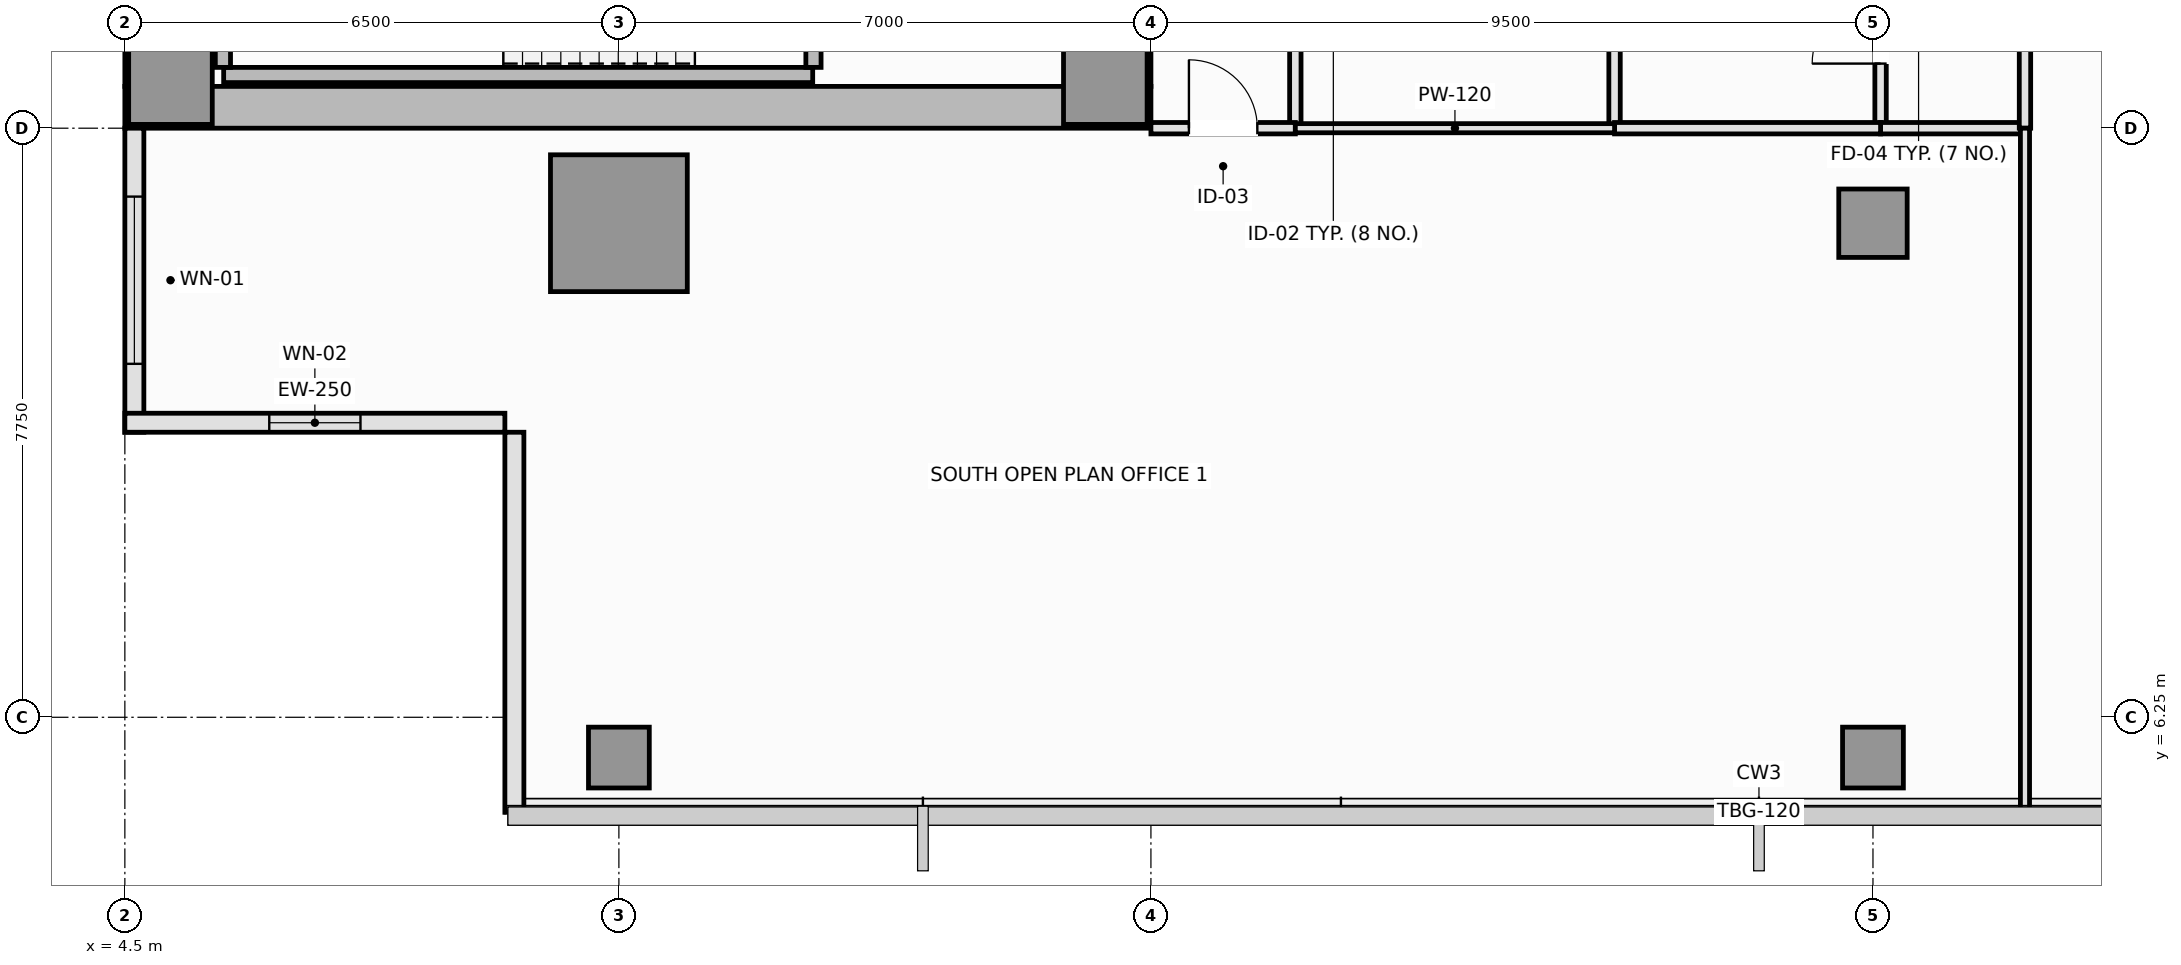
"""IFC4 building model, lengths in metres.
Left out: names, types, materials, properties, quantities, classifications, styles, units other than length and angle.
Written with IfcOpenShell. Run it as: python <this file> out.ifc"""

import sys

from ifc_helpers import new_model, si_unit, direction, frame, frame_2d, origin, origin_2d, place, context, subcontext, project, spatial, rectangle, extrude, element, fill, save


model = new_model("IFC4")
c1 = context("Model", 3, precision=1e-05, world=origin(), true_north=direction((0.0, 1.0)))
c2 = subcontext(c1, "Body", "Model", "MODEL_VIEW")
j1 = project(units=[si_unit("LENGTHUNIT", "METRE"), si_unit("PLANEANGLEUNIT", "RADIAN")], contexts=[c1])
p1 = place(None, origin())
s1 = spatial("IfcSite", under=j1, at=p1, CompositionType="ELEMENT")
p2 = place(p1, origin())
s2 = spatial("IfcBuilding", under=s1, at=p2, CompositionType="ELEMENT")
p3 = place(p2, frame((0.0, 0.0, 191.6)))
s3 = spatial("IfcBuildingStorey", under=s2, at=p3, CompositionType="ELEMENT", Elevation=191.6)
p4 = place(p3, frame((4.5, 14.275, 0.0), z_axis=(0.0, 0.0, 1.0), x_axis=(1.0, 0.0, 0.0)))
e1 = element("IfcWall", 1, at=p4, inside=s3, PredefinedType="SHEAR", context=c2, shape_type="SweptSolid", body=[
    extrude(rectangle(XDim=13.5, YDim=0.55, at=frame_2d((6.75, 0.0))), origin(), (0.0, 0.0, 1.0), 3.55),
])
p5 = place(p3, frame((4.775, 14.55, 0.0), z_axis=(0.0, 0.0, 1.0), x_axis=(0.0, 1.0, 0.0)))
e2 = element("IfcWall", 2, at=p5, inside=s3, PredefinedType="SHEAR", context=c2, shape_type="SweptSolid", body=[
    extrude(rectangle(XDim=21.4, YDim=0.55, at=frame_2d((10.7, 0.0))), origin(), (0.0, 0.0, 1.0), 3.55),
])
p6 = place(p3, frame((17.725, 14.55, 0.0), z_axis=(0.0, 0.0, 1.0), x_axis=(0.0, 1.0, 0.0)))
e3 = element("IfcWall", 3, at=p6, inside=s3, PredefinedType="SHEAR", context=c2, shape_type="SweptSolid", body=[
    extrude(rectangle(XDim=8.9, YDim=0.55, at=frame_2d((4.45, 0.0))), origin(), (0.0, 0.0, 1.0), 3.55),
])
p7 = place(p6, frame((4.35, 0.0, 0.0)))
e4 = element("IfcOpeningElement", 4, at=p7, cuts=e3, PredefinedType="OPENING", context=c2, shape_type="SweptSolid", body=[
    extrude(rectangle(XDim=1.1, YDim=2.15, at=frame_2d((0.55, 1.075))), frame((0.0, 0.285, 0.0), z_axis=(0.0, -1.0, 0.0), x_axis=(1.0, 0.0, 0.0)), (0.0, 0.0, 1.0), 0.57),
])
for number, where, z_axis, x_axis in (
    (5, (5.1, 14.6, 0.0), (0.0, 0.0, 1.0), (1.0, 0.0, 0.0)),
    (6, (17.4, 14.6, 0.0), (0.0, 0.0, 1.0), (1.0, 0.0, 0.0)),
):
    element("IfcColumn", number, at=place(p3, frame(where, z_axis=z_axis, x_axis=x_axis)), inside=s3, PredefinedType="PILASTER", context=c2, shape_type="SweptSolid", body=[
        extrude(rectangle(XDim=1.1, YDim=1.1, at=origin_2d()), origin(), (0.0, 0.0, 1.0), 3.55),
    ])
p8 = place(p3, frame((11.0, 12.75, 0.0), z_axis=(0.0, 0.0, 1.0), x_axis=(1.0, 0.0, 0.0)))
e7 = element("IfcColumn", 7, at=p8, inside=s3, PredefinedType="COLUMN", context=c2, shape_type="SweptSolid", body=[
    extrude(rectangle(XDim=1.8, YDim=1.8, at=origin_2d()), origin(), (0.0, 0.0, 1.0), 3.55),
])
p9 = place(p3, frame((27.5, 12.75, 0.0), z_axis=(0.0, 0.0, 1.0), x_axis=(1.0, 0.0, 0.0)))
e8 = element("IfcColumn", 8, at=p9, inside=s3, PredefinedType="COLUMN", context=c2, shape_type="SweptSolid", body=[
    extrude(rectangle(XDim=0.9, YDim=0.9, at=origin_2d()), origin(), (0.0, 0.0, 1.0), 3.55),
])
for number, where, z_axis, x_axis in (
    (9, (11.0, 5.72, 0.0), (0.0, 0.0, 1.0), (1.0, 0.0, 0.0)),
    (10, (27.5, 5.72, 0.0), (0.0, 0.0, 1.0), (1.0, 0.0, 0.0)),
):
    element("IfcColumn", number, at=place(p3, frame(where, z_axis=z_axis, x_axis=x_axis)), inside=s3, PredefinedType="COLUMN", context=c2, shape_type="SweptSolid", body=[
        extrude(rectangle(XDim=0.8, YDim=0.8, at=origin_2d()), origin(), (0.0, 0.0, 1.0), 3.55),
    ])
p10 = place(p3, frame((4.625, 14.0, 0.0), z_axis=(0.0, 0.0, 1.0), x_axis=(0.0, -1.0, 0.0)))
e11 = element("IfcWall", 11, at=p10, inside=s3, PredefinedType="SOLIDWALL", context=c2, shape_type="SweptSolid", body=[
    extrude(rectangle(XDim=4.0, YDim=0.25, at=frame_2d((2.0, 0.0))), origin(), (0.0, 0.0, 1.0), 3.37),
])
p11 = place(p10, frame((0.9, 0.0, 0.9)))
e12 = element("IfcOpeningElement", 12, at=p11, cuts=e11, PredefinedType="OPENING", context=c2, shape_type="SweptSolid", body=[
    extrude(rectangle(XDim=2.2, YDim=1.8, at=frame_2d((1.1, 0.9))), frame((0.0, 0.135, 0.0), z_axis=(0.0, -1.0, 0.0), x_axis=(1.0, 0.0, 0.0)), (0.0, 0.0, 1.0), 0.27),
])
p12 = place(p3, frame((4.5, 10.125, 0.0), z_axis=(0.0, 0.0, 1.0), x_axis=(1.0, 0.0, 0.0)))
e13 = element("IfcWall", 13, at=p12, inside=s3, PredefinedType="SOLIDWALL", context=c2, shape_type="SweptSolid", body=[
    extrude(rectangle(XDim=5.0, YDim=0.25, at=frame_2d((2.5, 0.0))), origin(), (0.0, 0.0, 1.0), 3.37),
])
p13 = place(p12, frame((1.9, 0.0, 0.9)))
e14 = element("IfcOpeningElement", 14, at=p13, cuts=e13, PredefinedType="OPENING", context=c2, shape_type="SweptSolid", body=[
    extrude(rectangle(XDim=1.2, YDim=1.8, at=frame_2d((0.6, 0.9))), frame((0.0, 0.135, 0.0), z_axis=(0.0, -1.0, 0.0), x_axis=(1.0, 0.0, 0.0)), (0.0, 0.0, 1.0), 0.27),
])
p14 = place(p3, frame((9.625, 10.0, 0.0), z_axis=(0.0, 0.0, 1.0), x_axis=(0.0, -1.0, 0.0)))
e15 = element("IfcWall", 15, at=p14, inside=s3, PredefinedType="SOLIDWALL", context=c2, shape_type="SweptSolid", body=[
    extrude(rectangle(XDim=5.0, YDim=0.25, at=frame_2d((2.5, 0.0))), origin(), (0.0, 0.0, 1.0), 3.37),
])
p15 = place(p3, frame((5.8, 14.7, 0.0), z_axis=(0.0, 0.0, 1.0), x_axis=(1.0, 0.0, 0.0)))
e16 = element("IfcWall", 16, at=p15, inside=s3, PredefinedType="SOLIDWALL", context=c2, shape_type="SweptSolid", body=[
    extrude(rectangle(XDim=7.75, YDim=0.2, at=frame_2d((3.875, 0.0))), origin(), (0.0, 0.0, 1.0), 3.55),
])
p16 = place(p3, frame((5.79, 14.8, 0.0), z_axis=(0.0, 0.0, 1.0), x_axis=(0.0, 1.0, 0.0)))
e17 = element("IfcWall", 17, at=p16, inside=s3, PredefinedType="SOLIDWALL", context=c2, shape_type="SweptSolid", body=[
    extrude(rectangle(XDim=3.05, YDim=0.2, at=frame_2d((1.525, 0.0))), origin(), (0.0, 0.0, 1.0), 3.55),
])
p17 = place(p3, frame((13.56, 14.8, 0.0), z_axis=(0.0, 0.0, 1.0), x_axis=(0.0, 1.0, 0.0)))
e18 = element("IfcWall", 18, at=p17, inside=s3, PredefinedType="SOLIDWALL", context=c2, shape_type="SweptSolid", body=[
    extrude(rectangle(XDim=3.05, YDim=0.2, at=frame_2d((1.525, 0.0))), origin(), (0.0, 0.0, 1.0), 3.55),
])
p18 = place(p17, frame((0.95, 0.0, 0.0)))
e19 = element("IfcOpeningElement", 19, at=p18, cuts=e18, PredefinedType="OPENING", context=c2, shape_type="SweptSolid", body=[
    extrude(rectangle(XDim=1.15, YDim=2.15, at=frame_2d((0.575, 1.075))), frame((0.0, 0.11, 0.0), z_axis=(0.0, -1.0, 0.0), x_axis=(1.0, 0.0, 0.0)), (0.0, 0.0, 1.0), 0.22),
])
p19 = place(p3, frame((19.9, 14.0, 0.0), z_axis=(0.0, 0.0, 1.0), x_axis=(0.0, 1.0, 0.0)))
e20 = element("IfcWall", 20, at=p19, inside=s3, PredefinedType="PARTITIONING", context=c2, shape_type="SweptSolid", body=[
    extrude(rectangle(XDim=3.2, YDim=0.15, at=frame_2d((1.6, 0.0))), origin(), (0.0, 0.0, 1.0), 3.37),
])
p20 = place(p19, frame((1.1, 0.0, 0.0)))
e21 = element("IfcOpeningElement", 21, at=p20, cuts=e20, PredefinedType="OPENING", context=c2, shape_type="SweptSolid", body=[
    extrude(rectangle(XDim=1.0, YDim=2.15, at=frame_2d((0.5, 1.075))), frame((0.0, 0.085, 0.0), z_axis=(0.0, -1.0, 0.0), x_axis=(1.0, 0.0, 0.0)), (0.0, 0.0, 1.0), 0.17),
])
p21 = place(p3, frame((18.0, 14.0, 0.0), z_axis=(0.0, 0.0, 1.0), x_axis=(1.0, 0.0, 0.0)))
e22 = element("IfcWall", 22, at=p21, inside=s3, PredefinedType="PARTITIONING", context=c2, shape_type="SweptSolid", body=[
    extrude(rectangle(XDim=1.9, YDim=0.15, at=frame_2d((0.95, 0.0))), origin(), (0.0, 0.0, 1.0), 3.37),
])
p22 = place(p21, frame((0.5, 0.0, 0.0)))
e23 = element("IfcOpeningElement", 23, at=p22, cuts=e22, PredefinedType="OPENING", context=c2, shape_type="SweptSolid", body=[
    extrude(rectangle(XDim=0.9, YDim=2.1, at=frame_2d((0.45, 1.05))), frame((0.0, 0.085, 0.0), z_axis=(0.0, -1.0, 0.0), x_axis=(1.0, 0.0, 0.0)), (0.0, 0.0, 1.0), 0.17),
])
p23 = place(p3, frame((27.6, 14.0, 0.0), z_axis=(0.0, 0.0, 1.0), x_axis=(0.0, 1.0, 0.0)))
e24 = element("IfcWall", 24, at=p23, inside=s3, PredefinedType="PLUMBINGWALL", context=c2, shape_type="SweptSolid", body=[
    extrude(rectangle(XDim=2.6, YDim=0.15, at=frame_2d((1.3, 0.0))), origin(), (0.0, 0.0, 1.0), 3.37),
])
p24 = place(p23, frame((0.85, 0.0, 0.0)))
e25 = element("IfcOpeningElement", 25, at=p24, cuts=e24, PredefinedType="OPENING", context=c2, shape_type="SweptSolid", body=[
    extrude(rectangle(XDim=0.9, YDim=2.1, at=frame_2d((0.45, 1.05))), frame((0.0, 0.085, 0.0), z_axis=(0.0, -1.0, 0.0), x_axis=(1.0, 0.0, 0.0)), (0.0, 0.0, 1.0), 0.17),
])
p25 = place(p3, frame((27.6, 14.0, 0.0), z_axis=(0.0, 0.0, 1.0), x_axis=(1.0, 0.0, 0.0)))
e26 = element("IfcWall", 26, at=p25, inside=s3, PredefinedType="PARTITIONING", context=c2, shape_type="SweptSolid", body=[
    extrude(rectangle(XDim=1.9, YDim=0.15, at=frame_2d((0.95, 0.0))), origin(), (0.0, 0.0, 1.0), 3.37),
])
p26 = place(p3, frame((29.5, 14.0, 0.0), z_axis=(0.0, 0.0, 1.0), x_axis=(0.0, 1.0, 0.0)))
e27 = element("IfcWall", 27, at=p26, inside=s3, PredefinedType="PARTITIONING", context=c2, shape_type="SweptSolid", body=[
    extrude(rectangle(XDim=22.5, YDim=0.15, at=frame_2d((11.25, 0.0))), origin(), (0.0, 0.0, 1.0), 3.37),
])
p27 = place(p26, frame((10.75, 0.0, 0.0)))
e28 = element("IfcOpeningElement", 28, at=p27, cuts=e27, PredefinedType="OPENING", context=c2, shape_type="SweptSolid", body=[
    extrude(rectangle(XDim=1.0, YDim=2.15, at=frame_2d((0.5, 1.075))), frame((0.0, 0.085, 0.0), z_axis=(0.0, -1.0, 0.0), x_axis=(1.0, 0.0, 0.0)), (0.0, 0.0, 1.0), 0.17),
])
p28 = place(p3, frame((24.1, 14.0, 0.0), z_axis=(0.0, 0.0, 1.0), x_axis=(0.0, 1.0, 0.0)))
e29 = element("IfcWall", 29, at=p28, inside=s3, PredefinedType="PLUMBINGWALL", context=c2, shape_type="SweptSolid", body=[
    extrude(rectangle(XDim=2.6, YDim=0.15, at=frame_2d((1.3, 0.0))), origin(), (0.0, 0.0, 1.0), 3.07),
])
p29 = place(p3, frame((24.1, 14.0, 0.0), z_axis=(0.0, 0.0, 1.0), x_axis=(1.0, 0.0, 0.0)))
e30 = element("IfcWall", 30, at=p29, inside=s3, PredefinedType="PLUMBINGWALL", context=c2, shape_type="SweptSolid", body=[
    extrude(rectangle(XDim=3.5, YDim=0.15, at=frame_2d((1.75, 0.0))), origin(), (0.0, 0.0, 1.0), 3.37),
])
p30 = place(p3, frame((19.9, 14.0, 0.0), z_axis=(0.0, 0.0, 1.0), x_axis=(1.0, 0.0, 0.0)))
e31 = element("IfcWall", 31, at=p30, inside=s3, PredefinedType="PARTITIONING", context=c2, shape_type="SweptSolid", body=[
    extrude(rectangle(XDim=4.2, YDim=0.12, at=frame_2d((2.1, 0.0))), origin(), (0.0, 0.0, 1.0), 3.37),
])
p31 = place(p3, frame((29.5, 5.01, 0.0), z_axis=(0.0, 0.0, 1.0), x_axis=(0.0, 1.0, 0.0)))
e32 = element("IfcWall", 32, at=p31, inside=s3, PredefinedType="PARTITIONING", context=c2, shape_type="SweptSolid", body=[
    extrude(rectangle(XDim=8.99, YDim=0.12, at=frame_2d((4.495, 0.0))), origin(), (0.0, 0.0, 1.0), 3.37),
])
p32 = place(p11, origin())
e33 = element("IfcWindow", 33, at=p32, inside=s3, PartitioningType="SINGLE_PANEL", PredefinedType="WINDOW", context=c2, shape_type="SweptSolid", body=[
    extrude(rectangle(XDim=2.2, YDim=1.8, at=frame_2d((1.1, 0.9))), frame((0.0, 0.03, 0.0), z_axis=(0.0, -1.0, 0.0), x_axis=(1.0, 0.0, 0.0)), (0.0, 0.0, 1.0), 0.06),
])
fill(e12, e33)
p33 = place(p13, origin())
e34 = element("IfcWindow", 34, at=p33, inside=s3, PartitioningType="SINGLE_PANEL", PredefinedType="WINDOW", context=c2, shape_type="SweptSolid", body=[
    extrude(rectangle(XDim=1.2, YDim=1.8, at=frame_2d((0.6, 0.9))), frame((0.0, 0.03, 0.0), z_axis=(0.0, -1.0, 0.0), x_axis=(1.0, 0.0, 0.0)), (0.0, 0.0, 1.0), 0.06),
])
fill(e14, e34)
p34 = place(p22, origin())
e35 = element("IfcDoor", 35, at=p34, inside=s3, OperationType="SINGLE_SWING_LEFT", PredefinedType="DOOR", context=c2, shape_type="SweptSolid", body=[
    extrude(rectangle(XDim=0.9, YDim=2.1, at=frame_2d((0.45, 1.05))), frame((0.0, 0.025, 0.0), z_axis=(0.0, -1.0, 0.0), x_axis=(1.0, 0.0, 0.0)), (0.0, 0.0, 1.0), 0.05),
])
fill(e23, e35)
p35 = place(p24, origin())
e36 = element("IfcDoor", 36, at=p35, inside=s3, OperationType="SINGLE_SWING_LEFT", PredefinedType="DOOR", context=c2, shape_type="SweptSolid", body=[
    extrude(rectangle(XDim=0.9, YDim=2.1, at=frame_2d((0.45, 1.05))), frame((0.0, 0.025, 0.0), z_axis=(0.0, -1.0, 0.0), x_axis=(1.0, 0.0, 0.0)), (0.0, 0.0, 1.0), 0.05),
])
fill(e25, e36)
save(model, sys.argv[1])
